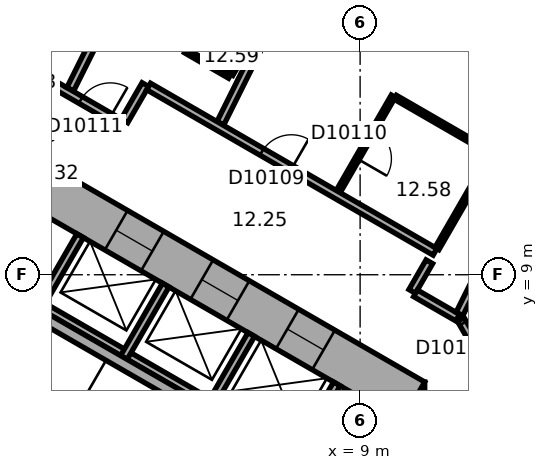
"""IFC4 building model, lengths in metres.
Left out: names, types, materials, properties, quantities, classifications, styles, units other than length and angle.
Written with IfcOpenShell. Run it as: python <this file> out.ifc"""

import sys

from ifc_helpers import new_model, si_unit, direction, frame, frame_2d, origin, place, context, subcontext, project, spatial, rectangle, extrude, element, fill, save


model = new_model("IFC4")
c1 = context("Model", 3, precision=1e-05, world=origin(), true_north=direction((0.0, 1.0)))
c2 = subcontext(c1, "Body", "Model", "MODEL_VIEW")
j1 = project(units=[si_unit("LENGTHUNIT", "METRE"), si_unit("PLANEANGLEUNIT", "RADIAN")], contexts=[c1])
p1 = place(None, origin())
s1 = spatial("IfcSite", under=j1, at=p1, CompositionType="ELEMENT")
p2 = place(p1, origin())
s2 = spatial("IfcBuilding", under=s1, at=p2, CompositionType="ELEMENT")
p3 = place(p2, frame((0.0, 0.0, 60.5)))
s3 = spatial("IfcBuildingStorey", under=s2, at=p3, CompositionType="ELEMENT", Elevation=60.5)
p4 = place(p3, frame((10.1, -6.177, 0.0), z_axis=(0.0, 0.0, 1.0), x_axis=(0.0, 1.0, 0.0)))
e1 = element("IfcWall", 1, at=p4, inside=s3, PredefinedType="SHEAR", context=c2, shape_type="SweptSolid", body=[
    extrude(rectangle(XDim=12.355, YDim=1.2, at=frame_2d((6.177, 0.0))), origin(), (0.0, 0.0, 1.0), 3.3),
])
p5 = place(p4, frame((6.378, 0.0, 0.0)))
e2 = element("IfcOpeningElement", 2, at=p5, cuts=e1, PredefinedType="OPENING", context=c2, shape_type="SweptSolid", body=[
    extrude(rectangle(XDim=1.5, YDim=2.1, at=frame_2d((0.75, 1.05))), frame((0.0, 0.61, 0.0), z_axis=(0.0, -1.0, 0.0), x_axis=(1.0, 0.0, 0.0)), (0.0, 0.0, 1.0), 1.22),
])
p6 = place(p4, frame((1.828, 0.0, 0.0)))
e3 = element("IfcOpeningElement", 3, at=p6, cuts=e1, PredefinedType="OPENING", context=c2, shape_type="SweptSolid", body=[
    extrude(rectangle(XDim=1.1, YDim=2.1, at=frame_2d((0.55, 1.05))), frame((0.0, 0.61, 0.0), z_axis=(0.0, -1.0, 0.0), x_axis=(1.0, 0.0, 0.0)), (0.0, 0.0, 1.0), 1.22),
])
p7 = place(p4, frame((4.427, 0.0, 0.0)))
e4 = element("IfcOpeningElement", 4, at=p7, cuts=e1, PredefinedType="OPENING", context=c2, shape_type="SweptSolid", body=[
    extrude(rectangle(XDim=1.1, YDim=2.1, at=frame_2d((0.55, 1.05))), frame((0.0, 0.61, 0.0), z_axis=(0.0, -1.0, 0.0), x_axis=(1.0, 0.0, 0.0)), (0.0, 0.0, 1.0), 1.22),
])
p8 = place(p3, frame((10.4, 5.658, 0.0), z_axis=(0.0, 0.0, 1.0), x_axis=(-0.866021384402, 0.500006961711, 0.0)))
e5 = element("IfcWall", 5, at=p8, inside=s3, PredefinedType="SHEAR", context=c2, shape_type="SweptSolid", body=[
    extrude(rectangle(XDim=12.355, YDim=1.2, at=frame_2d((6.178, 0.0))), origin(), (0.0, 0.0, 1.0), 3.3),
])
p9 = place(p8, frame((2.728, 0.0, 0.0)))
e6 = element("IfcOpeningElement", 6, at=p9, cuts=e5, PredefinedType="OPENING", context=c2, shape_type="SweptSolid", body=[
    extrude(rectangle(XDim=1.1, YDim=2.1, at=frame_2d((0.55, 1.05))), frame((0.0, 0.61, 0.0), z_axis=(0.0, -1.0, 0.0), x_axis=(1.0, 0.0, 0.0)), (0.0, 0.0, 1.0), 1.22),
])
p10 = place(p8, frame((5.328, 0.0, 0.0)))
e7 = element("IfcOpeningElement", 7, at=p10, cuts=e5, PredefinedType="OPENING", context=c2, shape_type="SweptSolid", body=[
    extrude(rectangle(XDim=1.1, YDim=2.1, at=frame_2d((0.55, 1.05))), frame((0.0, 0.61, 0.0), z_axis=(0.0, -1.0, 0.0), x_axis=(1.0, 0.0, 0.0)), (0.0, 0.0, 1.0), 1.22),
])
p11 = place(p8, frame((7.928, 0.0, 0.0)))
e8 = element("IfcOpeningElement", 8, at=p11, cuts=e5, PredefinedType="OPENING", context=c2, shape_type="SweptSolid", body=[
    extrude(rectangle(XDim=1.1, YDim=2.1, at=frame_2d((0.55, 1.05))), frame((0.0, 0.61, 0.0), z_axis=(0.0, -1.0, 0.0), x_axis=(1.0, 0.0, 0.0)), (0.0, 0.0, 1.0), 1.22),
])
p12 = place(p3, frame((7.424, 4.259, 0.0), z_axis=(0.0, 0.0, 1.0), x_axis=(-0.866026010844, 0.49999894854, 0.0)))
e9 = element("IfcWall", 9, at=p12, inside=s3, PredefinedType="PARTITIONING", context=c2, shape_type="SweptSolid", body=[
    extrude(rectangle(XDim=8.0, YDim=0.2, at=frame_2d((4.0, 0.0))), origin(), (0.0, 0.0, 1.0), 3.05),
])
for number, where, z_axis, x_axis in (
    (10, (7.287, 4.222, 0.0), (0.0, 0.0, 1.0), (0.5, 0.866, 0.0)),
    (11, (5.036, 5.522, 0.0), (0.0, 0.0, 1.0), (0.5, 0.866, 0.0)),
    (12, (2.784, 6.822, 0.0), (0.0, 0.0, 1.0), (0.5, 0.866, 0.0)),
    (13, (0.532, 8.122, 0.0), (0.0, 0.0, 1.0), (0.5, 0.866, 0.0)),
):
    element("IfcWall", number, at=place(p3, frame(where, z_axis=z_axis, x_axis=x_axis)), inside=s3, PredefinedType="PARTITIONING", context=c2, shape_type="SweptSolid", body=[
        extrude(rectangle(XDim=2.2, YDim=0.2, at=frame_2d((1.1, 0.0))), origin(), (0.0, 0.0, 1.0), 3.05),
    ])
p13 = place(p3, frame((6.303, 4.617, 0.0), z_axis=(0.0, 0.0, 1.0), x_axis=(-0.866027801685, 0.499995846692, 0.0)))
e14 = element("IfcWall", 14, at=p13, inside=s3, PredefinedType="SHEAR", context=c2, shape_type="SweptSolid", body=[
    extrude(rectangle(XDim=7.06, YDim=0.3, at=frame_2d((3.53, 0.0))), origin(), (0.0, 0.0, 1.0), 3.05),
])
p14 = place(p3, frame((0.95, 14.001, 0.0), z_axis=(0.0, 0.0, 1.0), x_axis=(-1.0, 0.0, 0.0)))
e15 = element("IfcWall", 15, at=p14, inside=s3, PredefinedType="PARTITIONING", context=c2, shape_type="SweptSolid", body=[
    extrude(rectangle(XDim=1.86, YDim=0.2, at=frame_2d((0.93, 0.0))), origin(), (0.0, 0.0, 1.0), 3.05),
])
p15 = place(p14, frame((0.48, 0.0, 0.0)))
e16 = element("IfcOpeningElement", 16, at=p15, cuts=e15, PredefinedType="OPENING", context=c2, shape_type="SweptSolid", body=[
    extrude(rectangle(XDim=0.9, YDim=2.1, at=frame_2d((0.45, 1.05))), frame((0.0, 0.11, 0.0), z_axis=(0.0, -1.0, 0.0), x_axis=(1.0, 0.0, 0.0)), (0.0, 0.0, 1.0), 0.22),
])
p16 = place(p3, frame((2.748, 12.962, 0.0), z_axis=(0.0, 0.0, 1.0), x_axis=(-0.866013897511, 0.50001992892, 0.0)))
e17 = element("IfcWall", 17, at=p16, inside=s3, PredefinedType="PARTITIONING", context=c2, shape_type="SweptSolid", body=[
    extrude(rectangle(XDim=2.037, YDim=0.2, at=frame_2d((1.018, 0.0))), origin(), (0.0, 0.0, 1.0), 3.05),
])
p17 = place(p16, frame((0.372, 0.0, 0.0)))
e18 = element("IfcOpeningElement", 18, at=p17, cuts=e17, PredefinedType="OPENING", context=c2, shape_type="SweptSolid", body=[
    extrude(rectangle(XDim=0.9, YDim=2.1, at=frame_2d((0.45, 1.05))), frame((0.0, 0.11, 0.0), z_axis=(0.0, -1.0, 0.0), x_axis=(1.0, 0.0, 0.0)), (0.0, 0.0, 1.0), 0.22),
])
p18 = place(p3, frame((3.349, 14.002, 0.0), z_axis=(0.0, 0.0, 1.0), x_axis=(-0.500074377092, -0.865982457891, 0.0)))
e19 = element("IfcWall", 19, at=p18, inside=s3, PredefinedType="PARTITIONING", context=c2, shape_type="SweptSolid", body=[
    extrude(rectangle(XDim=1.101, YDim=0.2, at=frame_2d((0.55, 0.0))), origin(), (0.0, 0.0, 1.0), 3.05),
])
p19 = place(p3, frame((5.351, 21.859, 0.0), z_axis=(0.0, 0.0, 1.0), x_axis=(-0.446205309328, -0.894930624086, 0.0)))
e20 = element("IfcWall", 20, at=p19, inside=s3, PredefinedType="PARTITIONING", context=c2, shape_type="SweptSolid", body=[
    extrude(rectangle(XDim=8.913, YDim=0.2, at=frame_2d((4.457, 0.0))), origin(), (0.0, 0.0, 1.0), 2.6),
])
p20 = place(p3, frame((5.569, 14.222, 0.0), z_axis=(0.0, 0.0, 1.0), x_axis=(-0.866036909293, 0.499980071345, 0.0)))
e21 = element("IfcWall", 21, at=p20, inside=s3, PredefinedType="PARTITIONING", context=c2, shape_type="SweptSolid", body=[
    extrude(rectangle(XDim=1.34, YDim=0.12, at=frame_2d((0.67, 0.0))), origin(), (0.0, 0.0, 1.0), 3.05),
])
p21 = place(p3, frame((6.839, 16.422, 0.0), z_axis=(0.0, 0.0, 1.0), x_axis=(-0.50000366821, -0.866023285932, 0.0)))
e22 = element("IfcWall", 22, at=p21, inside=s3, PredefinedType="PARTITIONING", context=c2, shape_type="SweptSolid", body=[
    extrude(rectangle(XDim=2.48, YDim=0.12, at=frame_2d((1.24, 0.0))), origin(), (0.0, 0.0, 1.0), 3.05),
])
p22 = place(p3, frame((8.424, 11.188, 0.0), z_axis=(0.0, 0.0, 1.0), x_axis=(0.49995078051, 0.866053818805, 0.0)))
e23 = element("IfcWall", 23, at=p22, inside=s3, PredefinedType="PARTITIONING", context=c2, shape_type="SweptSolid", body=[
    extrude(rectangle(XDim=2.9, YDim=0.12, at=frame_2d((1.45, 0.0))), origin(), (0.0, 0.0, 1.0), 3.05),
])
p23 = place(p22, frame((1.0, 0.0, 0.0)))
e24 = element("IfcOpeningElement", 24, at=p23, cuts=e23, PredefinedType="OPENING", context=c2, shape_type="SweptSolid", body=[
    extrude(rectangle(XDim=0.9, YDim=2.1, at=frame_2d((0.45, 1.05))), frame((0.0, 0.07, 0.0), z_axis=(0.0, -1.0, 0.0), x_axis=(1.0, 0.0, 0.0)), (0.0, 0.0, 1.0), 0.14),
])
p24 = place(p3, frame((8.872, 20.104, 0.0), z_axis=(0.0, 0.0, 1.0), x_axis=(-0.446218378653, -0.894924107706, 0.0)))
e25 = element("IfcWall", 25, at=p24, inside=s3, PredefinedType="PARTITIONING", context=c2, shape_type="SweptSolid", body=[
    extrude(rectangle(XDim=7.95, YDim=0.2, at=frame_2d((3.975, 0.0))), origin(), (0.0, 0.0, 1.0), 3.05),
])
p25 = place(p3, frame((9.926, 13.67, 0.0), z_axis=(0.0, 0.0, 1.0), x_axis=(0.866032090307, -0.499988418424, 0.0)))
e26 = element("IfcWall", 26, at=p25, inside=s3, PredefinedType="PARTITIONING", context=c2, shape_type="SweptSolid", body=[
    extrude(rectangle(XDim=2.94, YDim=0.12, at=frame_2d((1.47, 0.0))), origin(), (0.0, 0.0, 1.0), 3.05),
])
p26 = place(p3, frame((10.371, 8.561, 0.0), z_axis=(0.0, 0.0, 1.0), x_axis=(0.50004290449, 0.866000631449, 0.0)))
e27 = element("IfcWall", 27, at=p26, inside=s3, PredefinedType="PARTITIONING", context=c2, shape_type="SweptSolid", body=[
    extrude(rectangle(XDim=0.901, YDim=0.2, at=frame_2d((0.451, 0.0))), origin(), (0.0, 0.0, 1.0), 3.05),
])
p27 = place(p3, frame((10.972, 9.602, 0.0), z_axis=(0.0, 0.0, 1.0), x_axis=(-0.866033277307, 0.499986362411, 0.0)))
e28 = element("IfcWall", 28, at=p27, inside=s3, PredefinedType="PARTITIONING", context=c2, shape_type="SweptSolid", body=[
    extrude(rectangle(XDim=8.702, YDim=0.2, at=frame_2d((4.351, 0.0))), origin(), (0.0, 0.0, 1.0), 3.05),
])
p28 = place(p27, frame((4.364, 0.0, 0.0)))
e29 = element("IfcOpeningElement", 29, at=p28, cuts=e28, PredefinedType="OPENING", context=c2, shape_type="SweptSolid", body=[
    extrude(rectangle(XDim=0.9, YDim=2.1, at=frame_2d((0.45, 1.05))), frame((0.0, 0.11, 0.0), z_axis=(0.0, -1.0, 0.0), x_axis=(1.0, 0.0, 0.0)), (0.0, 0.0, 1.0), 0.22),
])
p29 = place(p3, frame((11.566, 7.871, 0.0), z_axis=(0.0, 0.0, 1.0), x_axis=(-0.866004557827, 0.500036104519, 0.0)))
e30 = element("IfcWall", 30, at=p29, inside=s3, PredefinedType="PARTITIONING", context=c2, shape_type="SweptSolid", body=[
    extrude(rectangle(XDim=1.28, YDim=0.2, at=frame_2d((0.64, 0.0))), origin(), (0.0, 0.0, 1.0), 3.05),
])
p30 = place(p3, frame((12.442, 12.148, 0.0), z_axis=(0.0, 0.0, 1.0), x_axis=(-0.49994816717, -0.866055327414, 0.0)))
e31 = element("IfcWall", 31, at=p30, inside=s3, PredefinedType="PARTITIONING", context=c2, shape_type="SweptSolid", body=[
    extrude(rectangle(XDim=2.84, YDim=0.12, at=frame_2d((1.42, 0.0))), origin(), (0.0, 0.0, 1.0), 3.05),
])
p31 = place(p3, frame((12.58, 6.212, 0.0), z_axis=(0.0, 0.0, 1.0), x_axis=(-0.500063286585, 0.865988862174, 0.0)))
e32 = element("IfcWall", 32, at=p31, inside=s3, PredefinedType="PARTITIONING", context=c2, shape_type="SweptSolid", body=[
    extrude(rectangle(XDim=1.86, YDim=0.2, at=frame_2d((0.93, 0.0))), origin(), (0.0, 0.0, 1.0), 3.05),
])
p32 = place(p31, frame((0.842, 0.0, 0.0)))
e33 = element("IfcOpeningElement", 33, at=p32, cuts=e32, PredefinedType="OPENING", context=c2, shape_type="SweptSolid", body=[
    extrude(rectangle(XDim=0.9, YDim=2.1, at=frame_2d((0.45, 1.05))), frame((0.0, 0.11, 0.0), z_axis=(0.0, -1.0, 0.0), x_axis=(1.0, 0.0, 0.0)), (0.0, 0.0, 1.0), 0.22),
])
p33 = place(p3, frame((15.915, 16.592, 0.0), z_axis=(0.0, 0.0, 1.0), x_axis=(-0.446199736347, -0.894933402709, 0.0)))
e34 = element("IfcWall", 34, at=p33, inside=s3, PredefinedType="PARTITIONING", context=c2, shape_type="SweptSolid", body=[
    extrude(rectangle(XDim=9.635, YDim=0.2, at=frame_2d((4.817, 0.0))), origin(), (0.0, 0.0, 1.0), 3.05),
])
p34 = place(p9, origin())
e35 = element("IfcDoor", 35, at=p34, inside=s3, OperationType="DOUBLE_DOOR_SLIDING", PredefinedType="DOOR", context=c2, shape_type="SweptSolid", body=[
    extrude(rectangle(XDim=1.1, YDim=2.1, at=frame_2d((0.55, 1.05))), frame((0.0, 0.025, 0.0), z_axis=(0.0, -1.0, 0.0), x_axis=(1.0, 0.0, 0.0)), (0.0, 0.0, 1.0), 0.05),
])
fill(e6, e35)
p35 = place(p10, origin())
e36 = element("IfcDoor", 36, at=p35, inside=s3, OperationType="DOUBLE_DOOR_SLIDING", PredefinedType="DOOR", context=c2, shape_type="SweptSolid", body=[
    extrude(rectangle(XDim=1.1, YDim=2.1, at=frame_2d((0.55, 1.05))), frame((0.0, 0.025, 0.0), z_axis=(0.0, -1.0, 0.0), x_axis=(1.0, 0.0, 0.0)), (0.0, 0.0, 1.0), 0.05),
])
fill(e7, e36)
p36 = place(p11, origin())
e37 = element("IfcDoor", 37, at=p36, inside=s3, OperationType="DOUBLE_DOOR_SLIDING", PredefinedType="DOOR", context=c2, shape_type="SweptSolid", body=[
    extrude(rectangle(XDim=1.1, YDim=2.1, at=frame_2d((0.55, 1.05))), frame((0.0, 0.025, 0.0), z_axis=(0.0, -1.0, 0.0), x_axis=(1.0, 0.0, 0.0)), (0.0, 0.0, 1.0), 0.05),
])
fill(e8, e37)
p37 = place(p32, origin())
e38 = element("IfcDoor", 38, at=p37, inside=s3, OperationType="SINGLE_SWING_LEFT", PredefinedType="DOOR", context=c2, shape_type="SweptSolid", body=[
    extrude(rectangle(XDim=0.9, YDim=2.1, at=frame_2d((0.45, 1.05))), frame((0.0, 0.025, 0.0), z_axis=(0.0, -1.0, 0.0), x_axis=(1.0, 0.0, 0.0)), (0.0, 0.0, 1.0), 0.05),
])
fill(e33, e38)
p38 = place(p28, origin())
e39 = element("IfcDoor", 39, at=p38, inside=s3, OperationType="SINGLE_SWING_LEFT", PredefinedType="DOOR", context=c2, shape_type="SweptSolid", body=[
    extrude(rectangle(XDim=0.9, YDim=2.1, at=frame_2d((0.45, 1.05))), frame((0.0, 0.025, 0.0), z_axis=(0.0, -1.0, 0.0), x_axis=(1.0, 0.0, 0.0)), (0.0, 0.0, 1.0), 0.05),
])
fill(e29, e39)
p39 = place(p23, origin())
e40 = element("IfcDoor", 40, at=p39, inside=s3, OperationType="SINGLE_SWING_LEFT", PredefinedType="DOOR", context=c2, shape_type="SweptSolid", body=[
    extrude(rectangle(XDim=0.9, YDim=2.1, at=frame_2d((0.45, 1.05))), frame((0.0, 0.025, 0.0), z_axis=(0.0, -1.0, 0.0), x_axis=(1.0, 0.0, 0.0)), (0.0, 0.0, 1.0), 0.05),
])
fill(e24, e40)
p40 = place(p17, origin())
e41 = element("IfcDoor", 41, at=p40, inside=s3, OperationType="SINGLE_SWING_LEFT", PredefinedType="DOOR", context=c2, shape_type="SweptSolid", body=[
    extrude(rectangle(XDim=0.9, YDim=2.1, at=frame_2d((0.45, 1.05))), frame((0.0, 0.025, 0.0), z_axis=(0.0, -1.0, 0.0), x_axis=(1.0, 0.0, 0.0)), (0.0, 0.0, 1.0), 0.05),
])
fill(e18, e41)
save(model, sys.argv[1])
